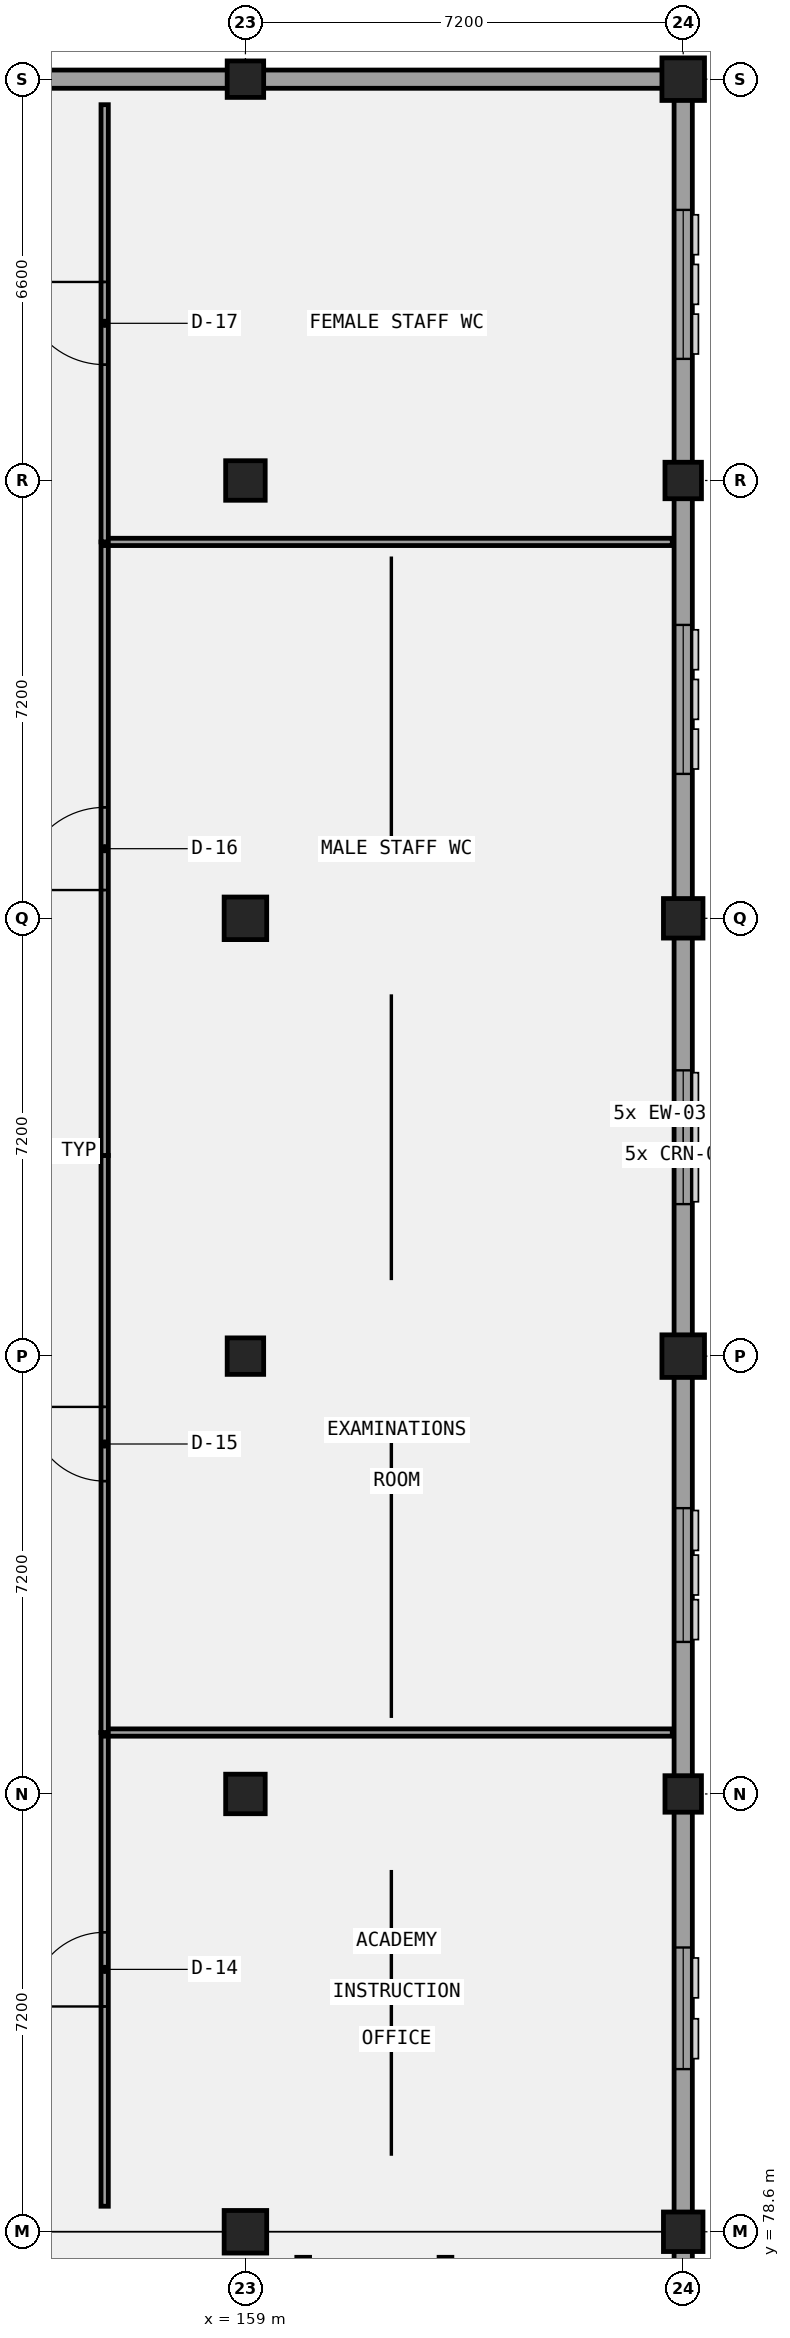
"""IFC4 building model, lengths in metres.
Left out: names, types, materials, properties, quantities, classifications, styles, units other than length and angle.
Written with IfcOpenShell. Run it as: python <this file> out.ifc"""

import sys

from ifc_helpers import new_model, si_unit, direction, frame, frame_2d, origin, origin_2d, place, context, subcontext, project, spatial, rectangle, extrude, element, fill, save


model = new_model("IFC4")
c1 = context("Model", 3, precision=1e-05, world=origin(), true_north=direction((0.0, 1.0)))
c2 = subcontext(c1, "Body", "Model", "MODEL_VIEW")
j1 = project(units=[si_unit("LENGTHUNIT", "METRE"), si_unit("PLANEANGLEUNIT", "RADIAN")], contexts=[c1])
p1 = place(None, origin())
s1 = spatial("IfcSite", under=j1, at=p1, CompositionType="ELEMENT")
p2 = place(p1, origin())
s2 = spatial("IfcBuilding", under=s1, at=p2, CompositionType="ELEMENT")
p3 = place(p2, frame((0.0, 0.0, 13.8)))
s3 = spatial("IfcBuildingStorey", under=s2, at=p3, CompositionType="ELEMENT", Elevation=13.8)
p4 = place(p3, frame((159.0, 78.6, 0.0), z_axis=(0.0, 0.0, 1.0), x_axis=(1.0, 0.0, 0.0)))
e1 = element("IfcColumn", 1, at=p4, inside=s3, PredefinedType="COLUMN", context=c2, shape_type="SweptSolid", body=[
    extrude(rectangle(XDim=0.7, YDim=0.7, at=origin_2d()), origin(), (0.0, 0.0, 1.0), 4.2),
])
p5 = place(p3, frame((159.0, 85.8, 0.0), z_axis=(0.0, 0.0, 1.0), x_axis=(1.0, 0.0, 0.0)))
e2 = element("IfcColumn", 2, at=p5, inside=s3, PredefinedType="COLUMN", context=c2, shape_type="SweptSolid", body=[
    extrude(rectangle(XDim=0.65, YDim=0.65, at=origin_2d()), origin(), (0.0, 0.0, 1.0), 4.2),
])
p6 = place(p3, frame((159.0, 93.0, 0.0), z_axis=(0.0, 0.0, 1.0), x_axis=(1.0, 0.0, 0.0)))
e3 = element("IfcColumn", 3, at=p6, inside=s3, PredefinedType="COLUMN", context=c2, shape_type="SweptSolid", body=[
    extrude(rectangle(XDim=0.6, YDim=0.6, at=origin_2d()), origin(), (0.0, 0.0, 1.0), 4.2),
])
p7 = place(p3, frame((159.0, 100.2, 0.0), z_axis=(0.0, 0.0, 1.0), x_axis=(1.0, 0.0, 0.0)))
e4 = element("IfcColumn", 4, at=p7, inside=s3, PredefinedType="COLUMN", context=c2, shape_type="SweptSolid", body=[
    extrude(rectangle(XDim=0.7, YDim=0.7, at=origin_2d()), origin(), (0.0, 0.0, 1.0), 4.2),
])
p8 = place(p3, frame((159.0, 107.4, 0.0), z_axis=(0.0, 0.0, 1.0), x_axis=(1.0, 0.0, 0.0)))
e5 = element("IfcColumn", 5, at=p8, inside=s3, PredefinedType="COLUMN", context=c2, shape_type="SweptSolid", body=[
    extrude(rectangle(XDim=0.65, YDim=0.65, at=origin_2d()), origin(), (0.0, 0.0, 1.0), 4.2),
])
p9 = place(p3, frame((159.0, 114.0, 0.0), z_axis=(0.0, 0.0, 1.0), x_axis=(1.0, 0.0, 0.0)))
e6 = element("IfcColumn", 6, at=p9, inside=s3, PredefinedType="COLUMN", context=c2, shape_type="SweptSolid", body=[
    extrude(rectangle(XDim=0.6, YDim=0.6, at=origin_2d()), origin(), (0.0, 0.0, 1.0), 4.2),
])
p10 = place(p3, frame((166.2, 78.6, 0.0), z_axis=(0.0, 0.0, 1.0), x_axis=(1.0, 0.0, 0.0)))
e7 = element("IfcColumn", 7, at=p10, inside=s3, PredefinedType="COLUMN", context=c2, shape_type="SweptSolid", body=[
    extrude(rectangle(XDim=0.65, YDim=0.65, at=origin_2d()), origin(), (0.0, 0.0, 1.0), 4.2),
])
p11 = place(p3, frame((166.2, 85.8, 0.0), z_axis=(0.0, 0.0, 1.0), x_axis=(1.0, 0.0, 0.0)))
e8 = element("IfcColumn", 8, at=p11, inside=s3, PredefinedType="COLUMN", context=c2, shape_type="SweptSolid", body=[
    extrude(rectangle(XDim=0.6, YDim=0.6, at=origin_2d()), origin(), (0.0, 0.0, 1.0), 4.2),
])
p12 = place(p3, frame((166.2, 93.0, 0.0), z_axis=(0.0, 0.0, 1.0), x_axis=(1.0, 0.0, 0.0)))
e9 = element("IfcColumn", 9, at=p12, inside=s3, PredefinedType="COLUMN", context=c2, shape_type="SweptSolid", body=[
    extrude(rectangle(XDim=0.7, YDim=0.7, at=origin_2d()), origin(), (0.0, 0.0, 1.0), 4.2),
])
p13 = place(p3, frame((166.2, 100.2, 0.0), z_axis=(0.0, 0.0, 1.0), x_axis=(1.0, 0.0, 0.0)))
e10 = element("IfcColumn", 10, at=p13, inside=s3, PredefinedType="COLUMN", context=c2, shape_type="SweptSolid", body=[
    extrude(rectangle(XDim=0.65, YDim=0.65, at=origin_2d()), origin(), (0.0, 0.0, 1.0), 4.2),
])
p14 = place(p3, frame((166.2, 107.4, 0.0), z_axis=(0.0, 0.0, 1.0), x_axis=(1.0, 0.0, 0.0)))
e11 = element("IfcColumn", 11, at=p14, inside=s3, PredefinedType="COLUMN", context=c2, shape_type="SweptSolid", body=[
    extrude(rectangle(XDim=0.6, YDim=0.6, at=origin_2d()), origin(), (0.0, 0.0, 1.0), 4.2),
])
p15 = place(p3, frame((166.2, 114.0, 0.0), z_axis=(0.0, 0.0, 1.0), x_axis=(1.0, 0.0, 0.0)))
e12 = element("IfcColumn", 12, at=p15, inside=s3, PredefinedType="COLUMN", context=c2, shape_type="SweptSolid", body=[
    extrude(rectangle(XDim=0.7, YDim=0.7, at=origin_2d()), origin(), (0.0, 0.0, 1.0), 4.2),
])
p16 = place(p3, frame((166.2, 49.99, 0.0), z_axis=(0.0, 0.0, 1.0), x_axis=(0.0, 1.0, 0.0)))
e13 = element("IfcWall", 13, at=p16, inside=s3, PredefinedType="SOLIDWALL", context=c2, shape_type="SweptSolid", body=[
    extrude(rectangle(XDim=28.46, YDim=0.3, at=frame_2d((14.23, 0.0))), origin(), (0.0, 0.0, 1.0), 3.14),
])
p17 = place(p16, frame((3.005, 0.0, 1.0)))
e14 = element("IfcOpeningElement", 14, at=p17, cuts=e13, PredefinedType="OPENING", context=c2, shape_type="SweptSolid", body=[
    extrude(rectangle(XDim=1.0, YDim=1.4, at=frame_2d((0.5, 0.7))), frame((0.0, 0.16, 0.0), z_axis=(0.0, -1.0, 0.0), x_axis=(1.0, 0.0, 0.0)), (0.0, 0.0, 1.0), 0.32),
])
p18 = place(p16, frame((10.11, 0.0, 1.0)))
e15 = element("IfcOpeningElement", 15, at=p18, cuts=e13, PredefinedType="OPENING", context=c2, shape_type="SweptSolid", body=[
    extrude(rectangle(XDim=1.0, YDim=1.4, at=frame_2d((0.5, 0.7))), frame((0.0, 0.16, 0.0), z_axis=(0.0, -1.0, 0.0), x_axis=(1.0, 0.0, 0.0)), (0.0, 0.0, 1.0), 0.32),
])
p19 = place(p16, frame((17.31, 0.0, 1.0)))
e16 = element("IfcOpeningElement", 16, at=p19, cuts=e13, PredefinedType="OPENING", context=c2, shape_type="SweptSolid", body=[
    extrude(rectangle(XDim=1.0, YDim=1.4, at=frame_2d((0.5, 0.7))), frame((0.0, 0.16, 0.0), z_axis=(0.0, -1.0, 0.0), x_axis=(1.0, 0.0, 0.0)), (0.0, 0.0, 1.0), 0.32),
])
p20 = place(p16, frame((24.435, 0.0, 1.0)))
e17 = element("IfcOpeningElement", 17, at=p20, cuts=e13, PredefinedType="OPENING", context=c2, shape_type="SweptSolid", body=[
    extrude(rectangle(XDim=1.0, YDim=1.4, at=frame_2d((0.5, 0.7))), frame((0.0, 0.16, 0.0), z_axis=(0.0, -1.0, 0.0), x_axis=(1.0, 0.0, 0.0)), (0.0, 0.0, 1.0), 0.32),
])
p21 = place(p3, frame((166.2, 78.75, 0.0), z_axis=(0.0, 0.0, 1.0), x_axis=(0.0, 1.0, 0.0)))
e18 = element("IfcWall", 18, at=p21, inside=s3, PredefinedType="SOLIDWALL", context=c2, shape_type="SweptSolid", body=[
    extrude(rectangle(XDim=35.1, YDim=0.3, at=frame_2d((17.55, 0.0))), origin(), (0.0, 0.0, 1.0), 2.94),
])
p22 = place(p21, frame((2.525, 0.0, 0.95)))
e19 = element("IfcOpeningElement", 19, at=p22, cuts=e18, PredefinedType="OPENING", context=c2, shape_type="SweptSolid", body=[
    extrude(rectangle(XDim=2.0, YDim=1.65, at=frame_2d((1.0, 0.825))), frame((0.0, 0.16, 0.0), z_axis=(0.0, -1.0, 0.0), x_axis=(1.0, 0.0, 0.0)), (0.0, 0.0, 1.0), 0.32),
])
p23 = place(p21, frame((9.55, 0.0, 0.95)))
e20 = element("IfcOpeningElement", 20, at=p23, cuts=e18, PredefinedType="OPENING", context=c2, shape_type="SweptSolid", body=[
    extrude(rectangle(XDim=2.2, YDim=1.4, at=frame_2d((1.1, 0.7))), frame((0.0, 0.16, 0.0), z_axis=(0.0, -1.0, 0.0), x_axis=(1.0, 0.0, 0.0)), (0.0, 0.0, 1.0), 0.32),
])
p24 = place(p21, frame((16.75, 0.0, 0.95)))
e21 = element("IfcOpeningElement", 21, at=p24, cuts=e18, PredefinedType="OPENING", context=c2, shape_type="SweptSolid", body=[
    extrude(rectangle(XDim=2.2, YDim=1.65, at=frame_2d((1.1, 0.825))), frame((0.0, 0.16, 0.0), z_axis=(0.0, -1.0, 0.0), x_axis=(1.0, 0.0, 0.0)), (0.0, 0.0, 1.0), 0.32),
])
p25 = place(p21, frame((23.825, 0.0, 0.95)))
e22 = element("IfcOpeningElement", 22, at=p25, cuts=e18, PredefinedType="OPENING", context=c2, shape_type="SweptSolid", body=[
    extrude(rectangle(XDim=2.45, YDim=1.4, at=frame_2d((1.225, 0.7))), frame((0.0, 0.16, 0.0), z_axis=(0.0, -1.0, 0.0), x_axis=(1.0, 0.0, 0.0)), (0.0, 0.0, 1.0), 0.32),
])
p26 = place(p21, frame((30.65, 0.0, 0.95)))
e23 = element("IfcOpeningElement", 23, at=p26, cuts=e18, PredefinedType="OPENING", context=c2, shape_type="SweptSolid", body=[
    extrude(rectangle(XDim=2.45, YDim=1.65, at=frame_2d((1.225, 0.825))), frame((0.0, 0.16, 0.0), z_axis=(0.0, -1.0, 0.0), x_axis=(1.0, 0.0, 0.0)), (0.0, 0.0, 1.0), 0.32),
])
p27 = place(p3, frame((166.35, 114.0, 0.0), z_axis=(0.0, 0.0, 1.0), x_axis=(-1.0, 0.0, 0.0)))
e24 = element("IfcWall", 24, at=p27, inside=s3, PredefinedType="SOLIDWALL", context=c2, shape_type="SweptSolid", body=[
    extrude(rectangle(XDim=21.9, YDim=0.3, at=frame_2d((10.95, 0.0))), origin(), (0.0, 0.0, 1.0), 3.19),
])
p28 = place(p27, frame((17.35, 0.0, 0.95)))
e25 = element("IfcOpeningElement", 25, at=p28, cuts=e24, PredefinedType="OPENING", context=c2, shape_type="SweptSolid", body=[
    extrude(rectangle(XDim=1.6, YDim=1.4, at=frame_2d((0.8, 0.7))), frame((0.0, 0.16, 0.0), z_axis=(0.0, -1.0, 0.0), x_axis=(1.0, 0.0, 0.0)), (0.0, 0.0, 1.0), 0.32),
])
p29 = place(p3, frame((156.685, 79.02, 0.0), z_axis=(0.0, 0.0, 1.0), x_axis=(0.0, 1.0, 0.0)))
e26 = element("IfcWall", 26, at=p29, inside=s3, PredefinedType="PARTITIONING", context=c2, shape_type="SweptSolid", body=[
    extrude(rectangle(XDim=7.79, YDim=0.12, at=frame_2d((3.895, 0.0))), origin(), (0.0, 0.0, 1.0), 3.94),
])
p30 = place(p29, frame((3.285, 0.0, 0.0)))
e27 = element("IfcOpeningElement", 27, at=p30, cuts=e26, PredefinedType="OPENING", context=c2, shape_type="SweptSolid", body=[
    extrude(rectangle(XDim=1.22, YDim=2.22, at=frame_2d((0.61, 1.11))), frame((0.0, 0.07, 0.0), z_axis=(0.0, -1.0, 0.0), x_axis=(1.0, 0.0, 0.0)), (0.0, 0.0, 1.0), 0.14),
])
p31 = place(p3, frame((156.685, 86.81, 0.0), z_axis=(0.0, 0.0, 1.0), x_axis=(1.0, 0.0, 0.0)))
e28 = element("IfcWall", 28, at=p31, inside=s3, PredefinedType="PARTITIONING", context=c2, shape_type="SweptSolid", body=[
    extrude(rectangle(XDim=9.335, YDim=0.12, at=frame_2d((4.667, 0.0))), origin(), (0.0, 0.0, 1.0), 3.94),
])
p32 = place(p3, frame((156.685, 86.81, 0.0), z_axis=(0.0, 0.0, 1.0), x_axis=(0.0, 1.0, 0.0)))
e29 = element("IfcWall", 29, at=p32, inside=s3, PredefinedType="PARTITIONING", context=c2, shape_type="SweptSolid", body=[
    extrude(rectangle(XDim=9.49, YDim=0.12, at=frame_2d((4.745, 0.0))), origin(), (0.0, 0.0, 1.0), 3.94),
])
p33 = place(p32, frame((4.135, 0.0, 0.0)))
e30 = element("IfcOpeningElement", 30, at=p33, cuts=e29, PredefinedType="OPENING", context=c2, shape_type="SweptSolid", body=[
    extrude(rectangle(XDim=1.22, YDim=2.35, at=frame_2d((0.61, 1.175))), frame((0.0, 0.07, 0.0), z_axis=(0.0, -1.0, 0.0), x_axis=(1.0, 0.0, 0.0)), (0.0, 0.0, 1.0), 0.14),
])
p34 = place(p3, frame((156.685, 96.3, 0.0), z_axis=(0.0, 0.0, 1.0), x_axis=(0.0, 1.0, 0.0)))
e31 = element("IfcWall", 31, at=p34, inside=s3, PredefinedType="PARTITIONING", context=c2, shape_type="SweptSolid", body=[
    extrude(rectangle(XDim=10.09, YDim=0.12, at=frame_2d((5.045, 0.0))), origin(), (0.0, 0.0, 1.0), 3.94),
])
p35 = place(p34, frame((4.365, 0.0, 0.0)))
e32 = element("IfcOpeningElement", 32, at=p35, cuts=e31, PredefinedType="OPENING", context=c2, shape_type="SweptSolid", body=[
    extrude(rectangle(XDim=1.36, YDim=2.1, at=frame_2d((0.68, 1.05))), frame((0.0, 0.07, 0.0), z_axis=(0.0, -1.0, 0.0), x_axis=(1.0, 0.0, 0.0)), (0.0, 0.0, 1.0), 0.14),
])
p36 = place(p3, frame((156.685, 106.39, 0.0), z_axis=(0.0, 0.0, 1.0), x_axis=(1.0, 0.0, 0.0)))
e33 = element("IfcWall", 33, at=p36, inside=s3, PredefinedType="PARTITIONING", context=c2, shape_type="SweptSolid", body=[
    extrude(rectangle(XDim=9.335, YDim=0.12, at=frame_2d((4.667, 0.0))), origin(), (0.0, 0.0, 1.0), 3.94),
])
p37 = place(p3, frame((156.685, 106.39, 0.0), z_axis=(0.0, 0.0, 1.0), x_axis=(0.0, 1.0, 0.0)))
e34 = element("IfcWall", 34, at=p37, inside=s3, PredefinedType="PARTITIONING", context=c2, shape_type="SweptSolid", body=[
    extrude(rectangle(XDim=7.19, YDim=0.12, at=frame_2d((3.595, 0.0))), origin(), (0.0, 0.0, 1.0), 3.94),
])
p38 = place(p37, frame((2.915, 0.0, 0.0)))
e35 = element("IfcOpeningElement", 35, at=p38, cuts=e34, PredefinedType="OPENING", context=c2, shape_type="SweptSolid", body=[
    extrude(rectangle(XDim=1.36, YDim=2.22, at=frame_2d((0.68, 1.11))), frame((0.0, 0.07, 0.0), z_axis=(0.0, -1.0, 0.0), x_axis=(1.0, 0.0, 0.0)), (0.0, 0.0, 1.0), 0.14),
])
p39 = place(p3, frame((159.95, 72.634, 0.0), z_axis=(0.0, 0.0, 1.0), x_axis=(0.0, 1.0, 0.0)))
e36 = element("IfcWall", 36, at=p39, inside=s3, PredefinedType="PARTITIONING", context=c2, shape_type="SweptSolid", body=[
    extrude(rectangle(XDim=5.546, YDim=0.21, at=frame_2d((2.773, 0.0))), origin(), (0.0, 0.0, 1.0), 3.94),
])
p40 = place(p39, frame((2.093, 0.0, 0.0)))
e37 = element("IfcOpeningElement", 37, at=p40, cuts=e36, PredefinedType="OPENING", context=c2, shape_type="SweptSolid", body=[
    extrude(rectangle(XDim=1.36, YDim=2.35, at=frame_2d((0.68, 1.175))), frame((0.0, 0.115, 0.0), z_axis=(0.0, -1.0, 0.0), x_axis=(1.0, 0.0, 0.0)), (0.0, 0.0, 1.0), 0.23),
])
p41 = place(p3, frame((162.29, 71.248, 0.0), z_axis=(0.0, 0.0, 1.0), x_axis=(0.0, 1.0, 0.0)))
e38 = element("IfcWall", 38, at=p41, inside=s3, PredefinedType="PARTITIONING", context=c2, shape_type="SweptSolid", body=[
    extrude(rectangle(XDim=6.932, YDim=0.21, at=frame_2d((3.466, 0.0))), origin(), (0.0, 0.0, 1.0), 3.94),
])
p42 = place(p41, frame((2.606, 0.0, 0.0)))
e39 = element("IfcOpeningElement", 39, at=p42, cuts=e38, PredefinedType="OPENING", context=c2, shape_type="SweptSolid", body=[
    extrude(rectangle(XDim=1.72, YDim=2.1, at=frame_2d((0.86, 1.05))), frame((0.0, 0.115, 0.0), z_axis=(0.0, -1.0, 0.0), x_axis=(1.0, 0.0, 0.0)), (0.0, 0.0, 1.0), 0.23),
])
p43 = place(p22, origin())
e40 = element("IfcWindow", 40, at=p43, inside=s3, PartitioningType="SINGLE_PANEL", PredefinedType="WINDOW", context=c2, shape_type="SweptSolid", body=[
    extrude(rectangle(XDim=2.0, YDim=1.65, at=frame_2d((1.0, 0.825))), frame((0.0, 0.03, 0.0), z_axis=(0.0, -1.0, 0.0), x_axis=(1.0, 0.0, 0.0)), (0.0, 0.0, 1.0), 0.06),
])
fill(e19, e40)
p44 = place(p23, origin())
e41 = element("IfcWindow", 41, at=p44, inside=s3, PartitioningType="SINGLE_PANEL", PredefinedType="WINDOW", context=c2, shape_type="SweptSolid", body=[
    extrude(rectangle(XDim=2.2, YDim=1.4, at=frame_2d((1.1, 0.7))), frame((0.0, 0.03, 0.0), z_axis=(0.0, -1.0, 0.0), x_axis=(1.0, 0.0, 0.0)), (0.0, 0.0, 1.0), 0.06),
])
fill(e20, e41)
p45 = place(p24, origin())
e42 = element("IfcWindow", 42, at=p45, inside=s3, PartitioningType="SINGLE_PANEL", PredefinedType="WINDOW", context=c2, shape_type="SweptSolid", body=[
    extrude(rectangle(XDim=2.2, YDim=1.65, at=frame_2d((1.1, 0.825))), frame((0.0, 0.03, 0.0), z_axis=(0.0, -1.0, 0.0), x_axis=(1.0, 0.0, 0.0)), (0.0, 0.0, 1.0), 0.06),
])
fill(e21, e42)
p46 = place(p25, origin())
e43 = element("IfcWindow", 43, at=p46, inside=s3, PartitioningType="SINGLE_PANEL", PredefinedType="WINDOW", context=c2, shape_type="SweptSolid", body=[
    extrude(rectangle(XDim=2.45, YDim=1.4, at=frame_2d((1.225, 0.7))), frame((0.0, 0.03, 0.0), z_axis=(0.0, -1.0, 0.0), x_axis=(1.0, 0.0, 0.0)), (0.0, 0.0, 1.0), 0.06),
])
fill(e22, e43)
p47 = place(p26, origin())
e44 = element("IfcWindow", 44, at=p47, inside=s3, PartitioningType="SINGLE_PANEL", PredefinedType="WINDOW", context=c2, shape_type="SweptSolid", body=[
    extrude(rectangle(XDim=2.45, YDim=1.65, at=frame_2d((1.225, 0.825))), frame((0.0, 0.03, 0.0), z_axis=(0.0, -1.0, 0.0), x_axis=(1.0, 0.0, 0.0)), (0.0, 0.0, 1.0), 0.06),
])
fill(e23, e44)
p48 = place(p30, origin())
e45 = element("IfcDoor", 45, at=p48, inside=s3, OperationType="SINGLE_SWING_LEFT", PredefinedType="DOOR", context=c2, shape_type="SweptSolid", body=[
    extrude(rectangle(XDim=1.22, YDim=2.22, at=frame_2d((0.61, 1.11))), frame((0.0, 0.025, 0.0), z_axis=(0.0, -1.0, 0.0), x_axis=(1.0, 0.0, 0.0)), (0.0, 0.0, 1.0), 0.05),
])
fill(e27, e45)
p49 = place(p33, origin())
e46 = element("IfcDoor", 46, at=p49, inside=s3, OperationType="SINGLE_SWING_RIGHT", PredefinedType="DOOR", context=c2, shape_type="SweptSolid", body=[
    extrude(rectangle(XDim=1.22, YDim=2.35, at=frame_2d((0.61, 1.175))), frame((0.0, 0.025, 0.0), z_axis=(0.0, -1.0, 0.0), x_axis=(1.0, 0.0, 0.0)), (0.0, 0.0, 1.0), 0.05),
])
fill(e30, e46)
p50 = place(p35, origin())
e47 = element("IfcDoor", 47, at=p50, inside=s3, OperationType="SINGLE_SWING_LEFT", PredefinedType="DOOR", context=c2, shape_type="SweptSolid", body=[
    extrude(rectangle(XDim=1.36, YDim=2.1, at=frame_2d((0.68, 1.05))), frame((0.0, 0.025, 0.0), z_axis=(0.0, -1.0, 0.0), x_axis=(1.0, 0.0, 0.0)), (0.0, 0.0, 1.0), 0.05),
])
fill(e32, e47)
p51 = place(p38, origin())
e48 = element("IfcDoor", 48, at=p51, inside=s3, OperationType="SINGLE_SWING_RIGHT", PredefinedType="DOOR", context=c2, shape_type="SweptSolid", body=[
    extrude(rectangle(XDim=1.36, YDim=2.22, at=frame_2d((0.68, 1.11))), frame((0.0, 0.025, 0.0), z_axis=(0.0, -1.0, 0.0), x_axis=(1.0, 0.0, 0.0)), (0.0, 0.0, 1.0), 0.05),
])
fill(e35, e48)
save(model, sys.argv[1])
